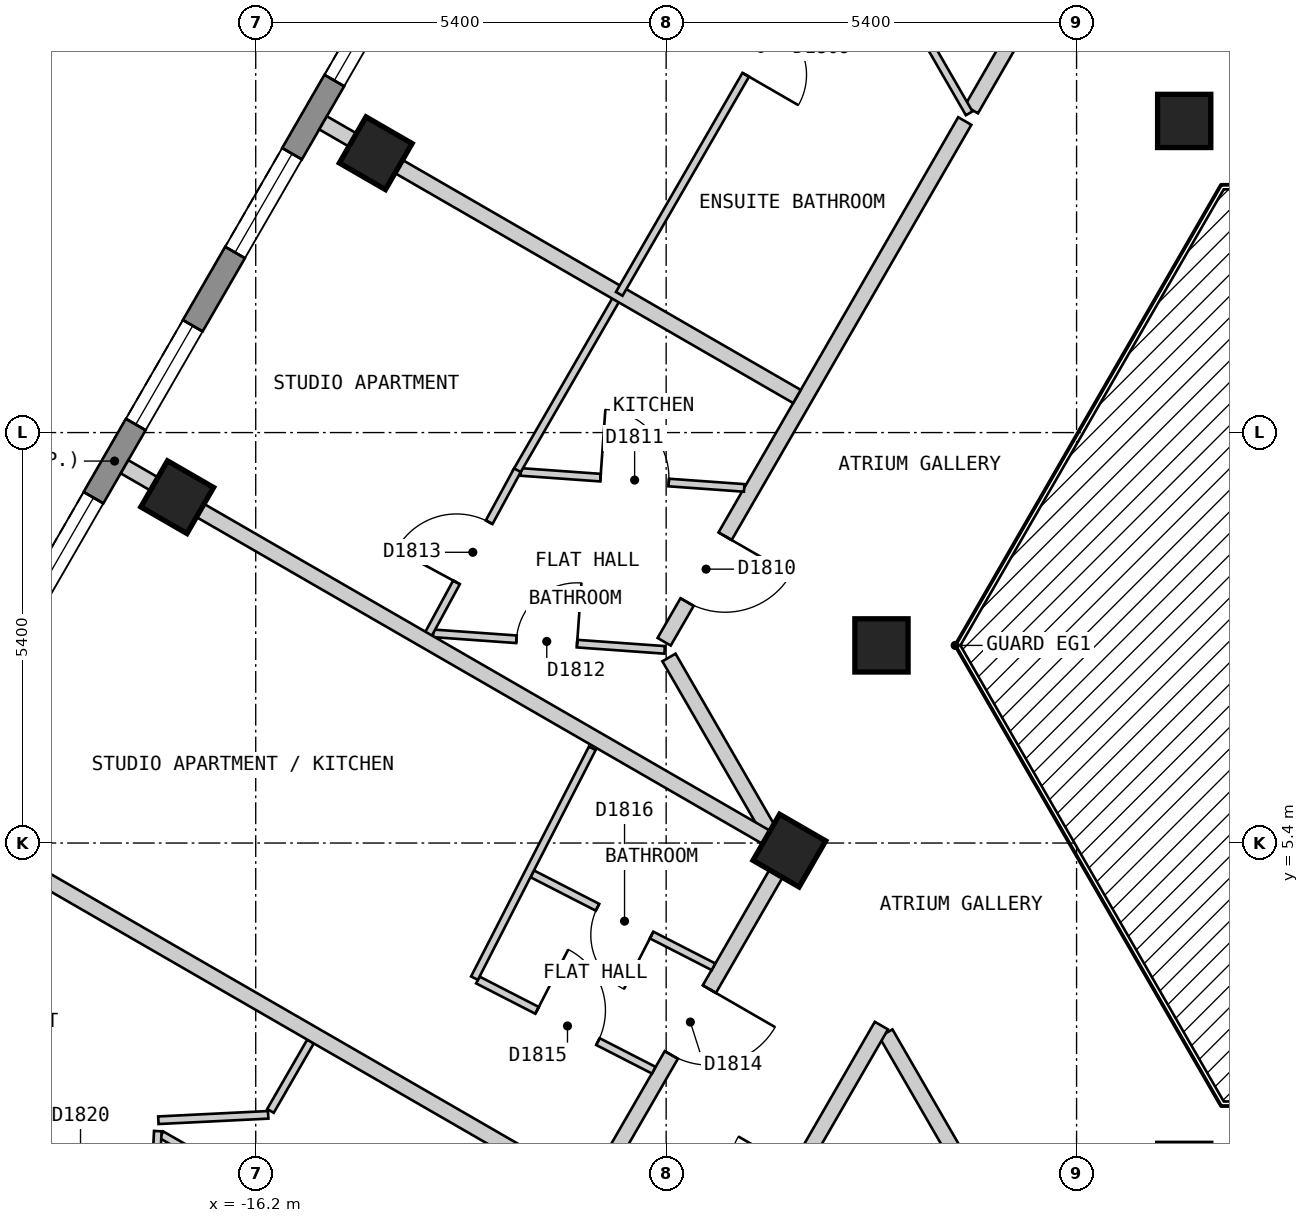
"""IFC4 building model, lengths in metres.
Left out: names, types, materials, properties, quantities, classifications, styles, units other than length and angle.
Written with IfcOpenShell. Run it as: python <this file> out.ifc"""

import sys

from ifc_helpers import new_model, si_unit, direction, frame, frame_2d, origin, origin_2d, place, context, subcontext, project, spatial, polyline, rectangle, outline, extrude, element, fill, save


model = new_model("IFC4")
c1 = context("Model", 3, precision=1e-05, world=origin(), true_north=direction((0.0, 1.0)))
c2 = subcontext(c1, "Body", "Model", "MODEL_VIEW")
j1 = project(units=[si_unit("LENGTHUNIT", "METRE"), si_unit("PLANEANGLEUNIT", "RADIAN")], contexts=[c1])
p1 = place(None, origin())
s1 = spatial("IfcSite", under=j1, at=p1, CompositionType="ELEMENT")
p2 = place(p1, origin())
s2 = spatial("IfcBuilding", under=s1, at=p2, CompositionType="ELEMENT")
p3 = place(p2, frame((0.0, 0.0, 208.8)))
s3 = spatial("IfcBuildingStorey", under=s2, at=p3, CompositionType="ELEMENT", Elevation=208.8)
for number, where, z_axis, x_axis in (
    (1, (-14.621, 14.475, 0.0), (0.0, 0.0, 1.0), (-0.5, -0.866, 0.0)),
    (2, (-17.233, 9.95, 0.0), (0.0, 0.0, 1.0), (-0.5, -0.866, 0.0)),
    (3, (-3.984, 14.9, 0.0), (0.0, 0.0, 1.0), (1.0, 0.0, 0.0)),
    (4, (-7.967, 8.0, 0.0), (0.0, 0.0, 1.0), (1.0, 0.0, 0.0)),
    (5, (-9.179, 5.3, 0.0), (0.0, 0.0, 1.0), (-0.5, -0.866, 0.0)),
):
    element("IfcColumn", number, at=place(p3, frame(where, z_axis=z_axis, x_axis=x_axis)), inside=s3, PredefinedType="COLUMN", context=c2, shape_type="SweptSolid", body=[
        extrude(rectangle(XDim=0.7, YDim=0.7, at=origin_2d()), origin(), (0.0, 0.0, 1.0), 3.0),
    ])
p4 = place(p3, frame((-12.514, 20.025, 0.0), z_axis=(0.0, 0.0, 1.0), x_axis=(-0.500003656944, -0.866023292436, 0.0)))
e6 = element("IfcWall", 6, at=p4, inside=s3, PredefinedType="SOLIDWALL", context=c2, shape_type="SweptSolid", body=[
    extrude(outline(polyline([(0.0, -0.15), (22.17, -0.15), (22.09, 0.15), (0.08, 0.15), (0.0, -0.15)])), origin(), (0.0, 0.0, 1.0), 2.7),
])
p5 = place(p4, frame((1.191, 0.0, 0.15)))
e7 = element("IfcOpeningElement", 7, at=p5, cuts=e6, PredefinedType="OPENING", context=c2, shape_type="SweptSolid", body=[
    extrude(rectangle(XDim=1.5, YDim=2.1, at=frame_2d((0.75, 1.05))), frame((0.0, 0.16, 0.0), z_axis=(0.0, -1.0, 0.0), x_axis=(1.0, 0.0, 0.0)), (0.0, 0.0, 1.0), 0.32),
])
p6 = place(p4, frame((3.804, 0.0, 0.15)))
e8 = element("IfcOpeningElement", 8, at=p6, cuts=e6, PredefinedType="OPENING", context=c2, shape_type="SweptSolid", body=[
    extrude(rectangle(XDim=1.5, YDim=2.1, at=frame_2d((0.75, 1.05))), frame((0.0, 0.16, 0.0), z_axis=(0.0, -1.0, 0.0), x_axis=(1.0, 0.0, 0.0)), (0.0, 0.0, 1.0), 0.32),
])
p7 = place(p4, frame((6.416, 0.0, 0.15)))
e9 = element("IfcOpeningElement", 9, at=p7, cuts=e6, PredefinedType="OPENING", context=c2, shape_type="SweptSolid", body=[
    extrude(rectangle(XDim=1.5, YDim=2.1, at=frame_2d((0.75, 1.05))), frame((0.0, 0.16, 0.0), z_axis=(0.0, -1.0, 0.0), x_axis=(1.0, 0.0, 0.0)), (0.0, 0.0, 1.0), 0.32),
])
p8 = place(p4, frame((9.029, 0.0, 0.15)))
e10 = element("IfcOpeningElement", 10, at=p8, cuts=e6, PredefinedType="OPENING", context=c2, shape_type="SweptSolid", body=[
    extrude(rectangle(XDim=1.5, YDim=2.1, at=frame_2d((0.75, 1.05))), frame((0.0, 0.16, 0.0), z_axis=(0.0, -1.0, 0.0), x_axis=(1.0, 0.0, 0.0)), (0.0, 0.0, 1.0), 0.32),
])
p9 = place(p4, frame((11.641, 0.0, 0.15)))
e11 = element("IfcOpeningElement", 11, at=p9, cuts=e6, PredefinedType="OPENING", context=c2, shape_type="SweptSolid", body=[
    extrude(rectangle(XDim=1.5, YDim=2.1, at=frame_2d((0.75, 1.05))), frame((0.0, 0.16, 0.0), z_axis=(0.0, -1.0, 0.0), x_axis=(1.0, 0.0, 0.0)), (0.0, 0.0, 1.0), 0.32),
])
p10 = place(p4, frame((14.254, 0.0, 0.15)))
e12 = element("IfcOpeningElement", 12, at=p10, cuts=e6, PredefinedType="OPENING", context=c2, shape_type="SweptSolid", body=[
    extrude(rectangle(XDim=1.5, YDim=2.1, at=frame_2d((0.75, 1.05))), frame((0.0, 0.16, 0.0), z_axis=(0.0, -1.0, 0.0), x_axis=(1.0, 0.0, 0.0)), (0.0, 0.0, 1.0), 0.32),
])
p11 = place(p4, frame((16.866, 0.0, 0.15)))
e13 = element("IfcOpeningElement", 13, at=p11, cuts=e6, PredefinedType="OPENING", context=c2, shape_type="SweptSolid", body=[
    extrude(rectangle(XDim=1.5, YDim=2.1, at=frame_2d((0.75, 1.05))), frame((0.0, 0.16, 0.0), z_axis=(0.0, -1.0, 0.0), x_axis=(1.0, 0.0, 0.0)), (0.0, 0.0, 1.0), 0.32),
])
p12 = place(p4, frame((19.479, 0.0, 0.15)))
e14 = element("IfcOpeningElement", 14, at=p12, cuts=e6, PredefinedType="OPENING", context=c2, shape_type="SweptSolid", body=[
    extrude(rectangle(XDim=1.5, YDim=2.1, at=frame_2d((0.75, 1.05))), frame((0.0, 0.16, 0.0), z_axis=(0.0, -1.0, 0.0), x_axis=(1.0, 0.0, 0.0)), (0.0, 0.0, 1.0), 0.32),
])
p13 = place(p3, frame((-10.763, 7.841, 0.0), z_axis=(0.0, 0.0, 1.0), x_axis=(0.499980792466, -0.866036492975, 0.0)))
e15 = element("IfcWall", 15, at=p13, inside=s3, PredefinedType="PARTITIONING", context=c2, shape_type="SweptSolid", body=[
    extrude(rectangle(XDim=2.618, YDim=0.2, at=frame_2d((1.309, 0.0))), origin(), (0.0, 0.0, 1.0), 2.7),
])
p14 = place(p3, frame((-7.909, 2.898, 0.0), z_axis=(0.0, 0.0, 1.0), x_axis=(0.50019444547, -0.865913111531, 0.0)))
e16 = element("IfcWall", 16, at=p14, inside=s3, PredefinedType="PARTITIONING", context=c2, shape_type="SweptSolid", body=[
    extrude(rectangle(XDim=1.761, YDim=0.2, at=frame_2d((0.88, 0.0))), origin(), (0.0, 0.0, 1.0), 2.7),
])
p15 = place(p3, frame((-10.623, -1.6, 0.0), z_axis=(0.0, 0.0, 1.0), x_axis=(0.500040865889, 0.866001808567, 0.0)))
e17 = element("IfcWall", 17, at=p15, inside=s3, PredefinedType="PARTITIONING", context=c2, shape_type="SweptSolid", body=[
    extrude(rectangle(XDim=5.31, YDim=0.2, at=frame_2d((2.655, 0.0))), origin(), (0.0, 0.0, 1.0), 2.7),
])
p16 = place(p15, frame((2.205, 0.0, 0.0)))
e18 = element("IfcOpeningElement", 18, at=p16, cuts=e17, PredefinedType="OPENING", context=c2, shape_type="SweptSolid", body=[
    extrude(rectangle(XDim=0.9, YDim=2.1, at=frame_2d((0.45, 1.05))), frame((0.0, 0.11, 0.0), z_axis=(0.0, -1.0, 0.0), x_axis=(1.0, 0.0, 0.0)), (0.0, 0.0, 1.0), 0.22),
])
p17 = place(p3, frame((-13.106, -1.5, 0.0), z_axis=(0.0, 0.0, 1.0), x_axis=(0.500025705601, 0.86601056214, 0.0)))
e19 = element("IfcWall", 19, at=p17, inside=s3, PredefinedType="PARTITIONING", context=c2, shape_type="SweptSolid", body=[
    extrude(rectangle(XDim=7.735, YDim=0.2, at=frame_2d((3.868, 0.0))), origin(), (0.0, 0.0, 1.0), 2.7),
])
p18 = place(p17, frame((4.748, 0.0, 0.0)))
e20 = element("IfcOpeningElement", 20, at=p18, cuts=e19, PredefinedType="OPENING", context=c2, shape_type="SweptSolid", body=[
    extrude(rectangle(XDim=1.0, YDim=2.1, at=frame_2d((0.5, 1.05))), frame((0.0, 0.11, 0.0), z_axis=(0.0, -1.0, 0.0), x_axis=(1.0, 0.0, 0.0)), (0.0, 0.0, 1.0), 0.22),
])
p19 = place(p17, frame((0.03, 0.0, 0.0)))
e21 = element("IfcOpeningElement", 21, at=p19, cuts=e19, PredefinedType="OPENING", context=c2, shape_type="SweptSolid", body=[
    extrude(rectangle(XDim=0.8, YDim=2.1, at=frame_2d((0.4, 1.05))), frame((0.0, 0.11, 0.0), z_axis=(0.0, -1.0, 0.0), x_axis=(1.0, 0.0, 0.0)), (0.0, 0.0, 1.0), 0.22),
])
p20 = place(p3, frame((-10.826, 8.048, 0.0), z_axis=(0.0, 0.0, 1.0), x_axis=(0.499953104851, 0.866052477019, 0.0)))
e22 = element("IfcWall", 22, at=p20, inside=s3, PredefinedType="PARTITIONING", context=c2, shape_type="SweptSolid", body=[
    extrude(rectangle(XDim=7.91, YDim=0.2, at=frame_2d((3.955, 0.0))), origin(), (0.0, 0.0, 1.0), 2.7),
])
p21 = place(p20, frame((0.603, 0.0, 0.0)))
e23 = element("IfcOpeningElement", 23, at=p21, cuts=e22, PredefinedType="OPENING", context=c2, shape_type="SweptSolid", body=[
    extrude(rectangle(XDim=1.0, YDim=2.1, at=frame_2d((0.5, 1.05))), frame((0.0, 0.11, 0.0), z_axis=(0.0, -1.0, 0.0), x_axis=(1.0, 0.0, 0.0)), (0.0, 0.0, 1.0), 0.22),
])
p22 = place(p3, frame((-6.784, 15.05, 0.0), z_axis=(0.0, 0.0, 1.0), x_axis=(0.500067724834, 0.865986299303, 0.0)))
e24 = element("IfcWall", 24, at=p22, inside=s3, PredefinedType="PARTITIONING", context=c2, shape_type="SweptSolid", body=[
    extrude(rectangle(XDim=2.713, YDim=0.2, at=frame_2d((1.357, 0.0))), origin(), (0.0, 0.0, 1.0), 2.7),
])
p23 = place(p3, frame((-7.628, 16.412, 0.0), z_axis=(0.0, 0.0, 1.0), x_axis=(0.499843439945, -0.866115774908, 0.0)))
e25 = element("IfcWall", 25, at=p23, inside=s3, PredefinedType="PARTITIONING", context=c2, shape_type="SweptSolid", body=[
    extrude(rectangle(XDim=1.63, YDim=0.1, at=frame_2d((0.815, 0.0))), origin(), (0.0, 0.0, 1.0), 2.7),
])
p24 = place(p3, frame((-12.562, 4.995, 0.0), z_axis=(0.0, 0.0, 1.0), x_axis=(0.889807979554, -0.456335139478, 0.0)))
e26 = element("IfcWall", 26, at=p24, inside=s3, PredefinedType="PARTITIONING", context=c2, shape_type="SweptSolid", body=[
    extrude(rectangle(XDim=2.68, YDim=0.1, at=frame_2d((1.34, 0.0))), origin(), (0.0, 0.0, 1.0), 2.7),
])
p25 = place(p24, frame((0.965, 0.0, 0.0)))
e27 = element("IfcOpeningElement", 27, at=p25, cuts=e26, PredefinedType="OPENING", context=c2, shape_type="SweptSolid", body=[
    extrude(rectangle(XDim=0.8, YDim=2.1, at=frame_2d((0.4, 1.05))), frame((0.0, 0.06, 0.0), z_axis=(0.0, -1.0, 0.0), x_axis=(1.0, 0.0, 0.0)), (0.0, 0.0, 1.0), 0.12),
])
p26 = place(p3, frame((-13.277, 3.598, 0.0), z_axis=(0.0, 0.0, 1.0), x_axis=(0.889780322893, -0.456389063182, 0.0)))
e28 = element("IfcWall", 28, at=p26, inside=s3, PredefinedType="PARTITIONING", context=c2, shape_type="SweptSolid", body=[
    extrude(rectangle(XDim=2.601, YDim=0.1, at=frame_2d((1.3, 0.0))), origin(), (0.0, 0.0, 1.0), 2.7),
])
p27 = place(p26, frame((0.875, 0.0, 0.0)))
e29 = element("IfcOpeningElement", 29, at=p27, cuts=e28, PredefinedType="OPENING", context=c2, shape_type="SweptSolid", body=[
    extrude(rectangle(XDim=0.9, YDim=2.1, at=frame_2d((0.45, 1.05))), frame((0.0, 0.06, 0.0), z_axis=(0.0, -1.0, 0.0), x_axis=(1.0, 0.0, 0.0)), (0.0, 0.0, 1.0), 0.12),
])
p28 = place(p3, frame((-17.441, 1.562, 0.0), z_axis=(0.0, 0.0, 1.0), x_axis=(0.867419073464, -0.497578286293, 0.0)))
e30 = element("IfcWall", 30, at=p28, inside=s3, PredefinedType="PARTITIONING", context=c2, shape_type="SweptSolid", body=[
    extrude(rectangle(XDim=5.185, YDim=0.1, at=frame_2d((2.593, 0.0))), origin(), (0.0, 0.0, 1.0), 2.7),
])
p29 = place(p28, frame((2.165, 0.0, 0.0)))
e31 = element("IfcOpeningElement", 31, at=p29, cuts=e30, PredefinedType="OPENING", context=c2, shape_type="SweptSolid", body=[
    extrude(rectangle(XDim=0.9, YDim=2.1, at=frame_2d((0.45, 1.05))), frame((0.0, 0.06, 0.0), z_axis=(0.0, -1.0, 0.0), x_axis=(1.0, 0.0, 0.0)), (0.0, 0.0, 1.0), 0.12),
])
p30 = place(p3, frame((-13.866, 8.159, 0.0), z_axis=(0.0, 0.0, 1.0), x_axis=(0.9974481372, -0.071394772886, 0.0)))
e32 = element("IfcWall", 32, at=p30, inside=s3, PredefinedType="PARTITIONING", context=c2, shape_type="SweptSolid", body=[
    extrude(rectangle(XDim=3.054, YDim=0.1, at=frame_2d((1.527, 0.0))), origin(), (0.0, 0.0, 1.0), 2.7),
])
p31 = place(p30, frame((1.099, 0.0, 0.0)))
e33 = element("IfcOpeningElement", 33, at=p31, cuts=e32, PredefinedType="OPENING", context=c2, shape_type="SweptSolid", body=[
    extrude(rectangle(XDim=0.8, YDim=2.1, at=frame_2d((0.4, 1.05))), frame((0.0, 0.06, 0.0), z_axis=(0.0, -1.0, 0.0), x_axis=(1.0, 0.0, 0.0)), (0.0, 0.0, 1.0), 0.12),
])
p32 = place(p3, frame((-12.712, 10.282, 0.0), z_axis=(0.0, 0.0, 1.0), x_axis=(0.997457858552, -0.071258826911, 0.0)))
e34 = element("IfcWall", 34, at=p32, inside=s3, PredefinedType="PARTITIONING", context=c2, shape_type="SweptSolid", body=[
    extrude(rectangle(XDim=2.947, YDim=0.1, at=frame_2d((1.473, 0.0))), origin(), (0.0, 0.0, 1.0), 2.7),
])
p33 = place(p32, frame((1.051, 0.0, 0.0)))
e35 = element("IfcOpeningElement", 35, at=p33, cuts=e34, PredefinedType="OPENING", context=c2, shape_type="SweptSolid", body=[
    extrude(rectangle(XDim=0.9, YDim=2.1, at=frame_2d((0.45, 1.05))), frame((0.0, 0.06, 0.0), z_axis=(0.0, -1.0, 0.0), x_axis=(1.0, 0.0, 0.0)), (0.0, 0.0, 1.0), 0.12),
])
p34 = place(p3, frame((-16.006, 1.876, 0.0), z_axis=(0.0, 0.0, 1.0), x_axis=(0.499949632511, 0.866054481515, 0.0)))
e36 = element("IfcWall", 36, at=p34, inside=s3, PredefinedType="PARTITIONING", context=c2, shape_type="SweptSolid", body=[
    extrude(rectangle(XDim=1.054, YDim=0.1, at=frame_2d((0.527, 0.0))), origin(), (0.0, 0.0, 1.0), 2.7),
])
p35 = place(p3, frame((-12.778, 10.268, 0.0), z_axis=(0.0, 0.0, 1.0), x_axis=(0.500084799062, 0.865976439487, 0.0)))
e37 = element("IfcWall", 37, at=p35, inside=s3, PredefinedType="PARTITIONING", context=c2, shape_type="SweptSolid", body=[
    extrude(rectangle(XDim=2.722, YDim=0.1, at=frame_2d((1.361, 0.0))), origin(), (0.0, 0.0, 1.0), 2.7),
])
p36 = place(p3, frame((-13.93, 8.145, 0.0), z_axis=(0.0, 0.0, 1.0), x_axis=(0.477194887681, 0.878797496111, 0.0)))
e38 = element("IfcWall", 38, at=p36, inside=s3, PredefinedType="PARTITIONING", context=c2, shape_type="SweptSolid", body=[
    extrude(rectangle(XDim=2.458, YDim=0.1, at=frame_2d((1.229, 0.0))), origin(), (0.0, 0.0, 1.0), 2.7),
])
p37 = place(p36, frame((0.779, 0.0, 0.0)))
e39 = element("IfcOpeningElement", 39, at=p37, cuts=e38, PredefinedType="OPENING", context=c2, shape_type="SweptSolid", body=[
    extrude(rectangle(XDim=0.9, YDim=2.1, at=frame_2d((0.45, 1.05))), frame((0.0, 0.06, 0.0), z_axis=(0.0, -1.0, 0.0), x_axis=(1.0, 0.0, 0.0)), (0.0, 0.0, 1.0), 0.12),
])
p38 = place(p3, frame((-13.322, 3.622, 0.0), z_axis=(0.0, 0.0, 1.0), x_axis=(0.456157649007, 0.889898982611, 0.0)))
e40 = element("IfcWall", 40, at=p38, inside=s3, PredefinedType="PARTITIONING", context=c2, shape_type="SweptSolid", body=[
    extrude(rectangle(XDim=3.398, YDim=0.1, at=frame_2d((1.699, 0.0))), origin(), (0.0, 0.0, 1.0), 2.7),
])
p39 = place(p3, frame((-17.503, 1.307, 0.0), z_axis=(0.0, 0.0, 1.0), x_axis=(0.049055201451, 0.99879606888, 0.0)))
e41 = element("IfcWall", 41, at=p39, inside=s3, PredefinedType="PARTITIONING", context=c2, shape_type="SweptSolid", body=[
    extrude(rectangle(XDim=0.303, YDim=0.1, at=frame_2d((0.152, 0.0))), origin(), (0.0, 0.0, 1.0), 2.7),
])
p40 = place(p3, frame((-17.481, 1.753, 0.0), z_axis=(0.0, 0.0, 1.0), x_axis=(0.998793651238, 0.049104401505, 0.0)))
e42 = element("IfcWall", 42, at=p40, inside=s3, PredefinedType="PARTITIONING", context=c2, shape_type="SweptSolid", body=[
    extrude(rectangle(XDim=1.447, YDim=0.1, at=frame_2d((0.723, 0.0))), origin(), (0.0, 0.0, 1.0), 2.7),
])
p41 = place(p3, frame((-20.539, 5.825, 0.0), z_axis=(0.0, 0.0, 1.0), x_axis=(0.866028187226, -0.499995178908, 0.0)))
e43 = element("IfcWall", 43, at=p41, inside=s3, PredefinedType="PARTITIONING", context=c2, shape_type="SweptSolid", body=[
    extrude(rectangle(XDim=9.996, YDim=0.2, at=frame_2d((4.998, 0.0))), origin(), (0.0, 0.0, 1.0), 2.7),
])
p42 = place(p3, frame((-17.926, 10.35, 0.0), z_axis=(0.0, 0.0, 1.0), x_axis=(0.866018411306, -0.500012111133, 0.0)))
e44 = element("IfcWall", 44, at=p42, inside=s3, PredefinedType="PARTITIONING", context=c2, shape_type="SweptSolid", body=[
    extrude(rectangle(XDim=9.898, YDim=0.2, at=frame_2d((4.949, 0.0))), origin(), (0.0, 0.0, 1.0), 2.7),
])
p43 = place(p3, frame((-15.314, 14.875, 0.0), z_axis=(0.0, 0.0, 1.0), x_axis=(0.866001485781, -0.500041424909, 0.0)))
e45 = element("IfcWall", 45, at=p43, inside=s3, PredefinedType="PARTITIONING", context=c2, shape_type="SweptSolid", body=[
    extrude(rectangle(XDim=7.2, YDim=0.2, at=frame_2d((3.6, 0.0))), origin(), (0.0, 0.0, 1.0), 2.7),
])
p44 = place(p3, frame((-11.417, 12.625, 0.0), z_axis=(0.0, 0.0, 1.0), x_axis=(0.500007885066, 0.866020851292, 0.0)))
e46 = element("IfcWall", 46, at=p44, inside=s3, PredefinedType="PARTITIONING", context=c2, shape_type="SweptSolid", body=[
    extrude(rectangle(XDim=7.33, YDim=0.1, at=frame_2d((3.665, 0.0))), origin(), (0.0, 0.0, 1.0), 2.7),
])
p45 = place(p44, frame((3.328, 0.0, 0.0)))
e47 = element("IfcOpeningElement", 47, at=p45, cuts=e46, PredefinedType="OPENING", context=c2, shape_type="SweptSolid", body=[
    extrude(rectangle(XDim=0.8, YDim=2.1, at=frame_2d((0.4, 1.05))), frame((0.0, 0.06, 0.0), z_axis=(0.0, -1.0, 0.0), x_axis=(1.0, 0.0, 0.0)), (0.0, 0.0, 1.0), 0.12),
])
p46 = place(p6, origin())
e48 = element("IfcWindow", 48, at=p46, inside=s3, PartitioningType="SINGLE_PANEL", PredefinedType="WINDOW", context=c2, shape_type="SweptSolid", body=[
    extrude(rectangle(XDim=1.5, YDim=2.1, at=frame_2d((0.75, 1.05))), frame((0.0, 0.03, 0.0), z_axis=(0.0, -1.0, 0.0), x_axis=(1.0, 0.0, 0.0)), (0.0, 0.0, 1.0), 0.06),
])
fill(e8, e48)
p47 = place(p7, origin())
e49 = element("IfcWindow", 49, at=p47, inside=s3, PartitioningType="SINGLE_PANEL", PredefinedType="WINDOW", context=c2, shape_type="SweptSolid", body=[
    extrude(rectangle(XDim=1.5, YDim=2.1, at=frame_2d((0.75, 1.05))), frame((0.0, 0.03, 0.0), z_axis=(0.0, -1.0, 0.0), x_axis=(1.0, 0.0, 0.0)), (0.0, 0.0, 1.0), 0.06),
])
fill(e9, e49)
p48 = place(p8, origin())
e50 = element("IfcWindow", 50, at=p48, inside=s3, PartitioningType="SINGLE_PANEL", PredefinedType="WINDOW", context=c2, shape_type="SweptSolid", body=[
    extrude(rectangle(XDim=1.5, YDim=2.1, at=frame_2d((0.75, 1.05))), frame((0.0, 0.03, 0.0), z_axis=(0.0, -1.0, 0.0), x_axis=(1.0, 0.0, 0.0)), (0.0, 0.0, 1.0), 0.06),
])
fill(e10, e50)
p49 = place(p9, origin())
e51 = element("IfcWindow", 51, at=p49, inside=s3, PartitioningType="SINGLE_PANEL", PredefinedType="WINDOW", context=c2, shape_type="SweptSolid", body=[
    extrude(rectangle(XDim=1.5, YDim=2.1, at=frame_2d((0.75, 1.05))), frame((0.0, 0.03, 0.0), z_axis=(0.0, -1.0, 0.0), x_axis=(1.0, 0.0, 0.0)), (0.0, 0.0, 1.0), 0.06),
])
fill(e11, e51)
p50 = place(p45, origin())
e52 = element("IfcDoor", 52, at=p50, inside=s3, OperationType="SINGLE_SWING_LEFT", PredefinedType="DOOR", context=c2, shape_type="SweptSolid", body=[
    extrude(rectangle(XDim=0.8, YDim=2.1, at=frame_2d((0.4, 1.05))), frame((0.0, 0.025, 0.0), z_axis=(0.0, -1.0, 0.0), x_axis=(1.0, 0.0, 0.0)), (0.0, 0.0, 1.0), 0.05),
])
fill(e47, e52)
p51 = place(p21, origin())
e53 = element("IfcDoor", 53, at=p51, inside=s3, OperationType="SINGLE_SWING_RIGHT", PredefinedType="DOOR", context=c2, shape_type="SweptSolid", body=[
    extrude(rectangle(XDim=1.0, YDim=2.1, at=frame_2d((0.5, 1.05))), frame((0.0, 0.025, 0.0), z_axis=(0.0, -1.0, 0.0), x_axis=(1.0, 0.0, 0.0)), (0.0, 0.0, 1.0), 0.05),
])
fill(e23, e53)
p52 = place(p33, origin())
e54 = element("IfcDoor", 54, at=p52, inside=s3, OperationType="SINGLE_SWING_LEFT", PredefinedType="DOOR", context=c2, shape_type="SweptSolid", body=[
    extrude(rectangle(XDim=0.9, YDim=2.1, at=frame_2d((0.45, 1.05))), frame((0.0, 0.025, 0.0), z_axis=(0.0, -1.0, 0.0), x_axis=(1.0, 0.0, 0.0)), (0.0, 0.0, 1.0), 0.05),
])
fill(e35, e54)
p53 = place(p31, origin())
e55 = element("IfcDoor", 55, at=p53, inside=s3, OperationType="SINGLE_SWING_RIGHT", PredefinedType="DOOR", context=c2, shape_type="SweptSolid", body=[
    extrude(rectangle(XDim=0.8, YDim=2.1, at=frame_2d((0.4, 1.05))), frame((0.0, 0.025, 0.0), z_axis=(0.0, -1.0, 0.0), x_axis=(1.0, 0.0, 0.0)), (0.0, 0.0, 1.0), 0.05),
])
fill(e33, e55)
p54 = place(p37, origin())
e56 = element("IfcDoor", 56, at=p54, inside=s3, OperationType="SINGLE_SWING_LEFT", PredefinedType="DOOR", context=c2, shape_type="SweptSolid", body=[
    extrude(rectangle(XDim=0.9, YDim=2.1, at=frame_2d((0.45, 1.05))), frame((0.0, 0.025, 0.0), z_axis=(0.0, -1.0, 0.0), x_axis=(1.0, 0.0, 0.0)), (0.0, 0.0, 1.0), 0.05),
])
fill(e39, e56)
p55 = place(p18, origin())
e57 = element("IfcDoor", 57, at=p55, inside=s3, OperationType="SINGLE_SWING_RIGHT", PredefinedType="DOOR", context=c2, shape_type="SweptSolid", body=[
    extrude(rectangle(XDim=1.0, YDim=2.1, at=frame_2d((0.5, 1.05))), frame((0.0, 0.025, 0.0), z_axis=(0.0, -1.0, 0.0), x_axis=(1.0, 0.0, 0.0)), (0.0, 0.0, 1.0), 0.05),
])
fill(e20, e57)
p56 = place(p27, origin())
e58 = element("IfcDoor", 58, at=p56, inside=s3, OperationType="SINGLE_SWING_LEFT", PredefinedType="DOOR", context=c2, shape_type="SweptSolid", body=[
    extrude(rectangle(XDim=0.9, YDim=2.1, at=frame_2d((0.45, 1.05))), frame((0.0, 0.025, 0.0), z_axis=(0.0, -1.0, 0.0), x_axis=(1.0, 0.0, 0.0)), (0.0, 0.0, 1.0), 0.05),
])
fill(e29, e58)
p57 = place(p25, origin())
e59 = element("IfcDoor", 59, at=p57, inside=s3, OperationType="SINGLE_SWING_RIGHT", PredefinedType="DOOR", context=c2, shape_type="SweptSolid", body=[
    extrude(rectangle(XDim=0.8, YDim=2.1, at=frame_2d((0.4, 1.05))), frame((0.0, 0.025, 0.0), z_axis=(0.0, -1.0, 0.0), x_axis=(1.0, 0.0, 0.0)), (0.0, 0.0, 1.0), 0.05),
])
fill(e27, e59)
save(model, sys.argv[1])
